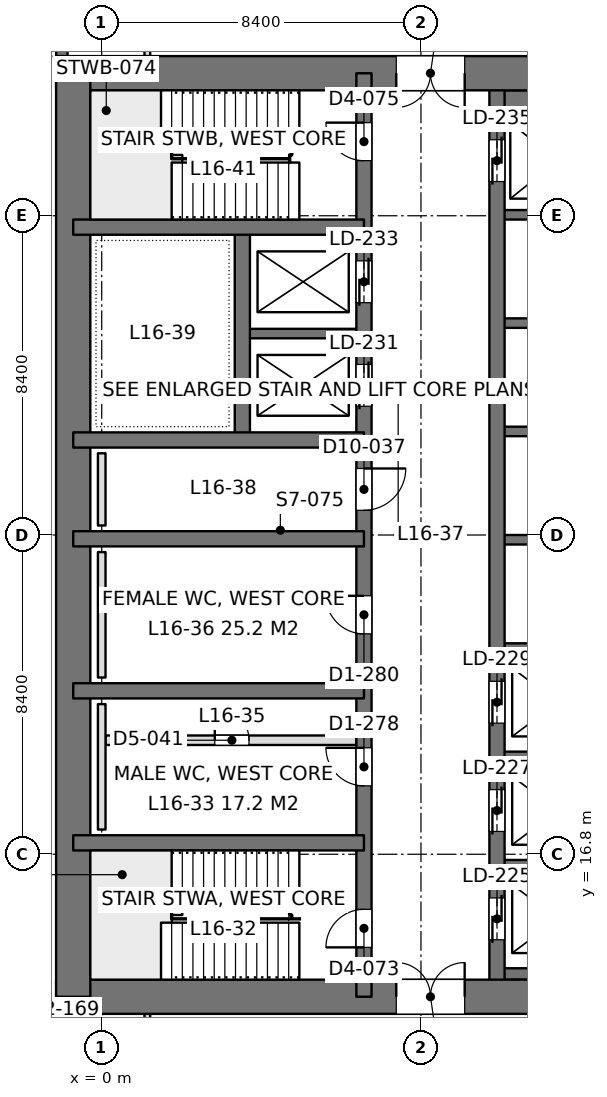
"""IFC4 building model, lengths in metres.
Left out: names, types, materials, properties, quantities, classifications, styles, units other than length and angle.
Written with IfcOpenShell. Run it as: python <this file> out.ifc"""

import sys

from ifc_helpers import new_model, si_unit, direction, frame, frame_2d, origin, place, context, subcontext, project, spatial, rectangle, extrude, element, fill, save


model = new_model("IFC4")
c1 = context("Model", 3, precision=1e-05, world=origin(), true_north=direction((0.0, 1.0)))
c2 = subcontext(c1, "Body", "Model", "MODEL_VIEW")
j1 = project(units=[si_unit("LENGTHUNIT", "METRE"), si_unit("PLANEANGLEUNIT", "RADIAN")], contexts=[c1])
p1 = place(None, origin())
s1 = spatial("IfcSite", under=j1, at=p1, CompositionType="ELEMENT")
p2 = place(p1, origin())
s2 = spatial("IfcBuilding", under=s1, at=p2, CompositionType="ELEMENT")
p3 = place(p2, frame((0.0, 0.0, 72.9)))
s3 = spatial("IfcBuildingStorey", under=s2, at=p3, CompositionType="ELEMENT", Elevation=72.9)
p4 = place(p3, frame((-1.2, 13.05, 0.0), z_axis=(0.0, 0.0, 1.0), x_axis=(1.0, 0.0, 0.0)))
e1 = element("IfcWall", 1, at=p4, inside=s3, PredefinedType="SHEAR", context=c2, shape_type="SweptSolid", body=[
    extrude(rectangle(XDim=18.0, YDim=0.9, at=frame_2d((9.0, 0.0))), origin(), (0.0, 0.0, 1.0), 4.5),
])
p5 = place(p4, frame((8.95, 0.0, 0.0)))
e2 = element("IfcOpeningElement", 2, at=p5, cuts=e1, PredefinedType="OPENING", context=c2, shape_type="SweptSolid", body=[
    extrude(rectangle(XDim=1.8, YDim=2.4, at=frame_2d((0.9, 1.2))), frame((0.0, 0.46, 0.0), z_axis=(0.0, -1.0, 0.0), x_axis=(1.0, 0.0, 0.0)), (0.0, 0.0, 1.0), 0.92),
])
p6 = place(p3, frame((-1.2, 37.35, 0.0), z_axis=(0.0, 0.0, 1.0), x_axis=(1.0, 0.0, 0.0)))
e3 = element("IfcWall", 3, at=p6, inside=s3, PredefinedType="SHEAR", context=c2, shape_type="SweptSolid", body=[
    extrude(rectangle(XDim=18.0, YDim=0.9, at=frame_2d((9.0, 0.0))), origin(), (0.0, 0.0, 1.0), 4.5),
])
p7 = place(p6, frame((8.95, 0.0, 0.0)))
e4 = element("IfcOpeningElement", 4, at=p7, cuts=e3, PredefinedType="OPENING", context=c2, shape_type="SweptSolid", body=[
    extrude(rectangle(XDim=1.8, YDim=2.4, at=frame_2d((0.9, 1.2))), frame((0.0, 0.46, 0.0), z_axis=(0.0, -1.0, 0.0), x_axis=(1.0, 0.0, 0.0)), (0.0, 0.0, 1.0), 0.92),
])
p8 = place(p3, frame((-0.75, 13.05, 0.0), z_axis=(0.0, 0.0, 1.0), x_axis=(0.0, 1.0, 0.0)))
e5 = element("IfcWall", 5, at=p8, inside=s3, PredefinedType="SHEAR", context=c2, shape_type="SweptSolid", body=[
    extrude(rectangle(XDim=24.3, YDim=0.9, at=frame_2d((12.15, 0.0))), origin(), (0.0, 0.0, 1.0), 4.5),
])
p9 = place(p3, frame((6.9, 13.05, 0.0), z_axis=(0.0, 0.0, 1.0), x_axis=(0.0, 1.0, 0.0)))
e6 = element("IfcWall", 6, at=p9, inside=s3, PredefinedType="SHEAR", context=c2, shape_type="SweptSolid", body=[
    extrude(rectangle(XDim=24.3, YDim=0.4, at=frame_2d((12.15, 0.0))), origin(), (0.0, 0.0, 1.0), 4.5),
])
p10 = place(p9, frame((1.3, 0.0, 0.0)))
e7 = element("IfcOpeningElement", 7, at=p10, cuts=e6, PredefinedType="OPENING", context=c2, shape_type="SweptSolid", body=[
    extrude(rectangle(XDim=1.0, YDim=2.2, at=frame_2d((0.5, 1.1))), frame((0.0, 0.21, 0.0), z_axis=(0.0, -1.0, 0.0), x_axis=(1.0, 0.0, 0.0)), (0.0, 0.0, 1.0), 0.42),
])
p11 = place(p9, frame((22.0, 0.0, 0.0)))
e8 = element("IfcOpeningElement", 8, at=p11, cuts=e6, PredefinedType="OPENING", context=c2, shape_type="SweptSolid", body=[
    extrude(rectangle(XDim=1.0, YDim=2.2, at=frame_2d((0.5, 1.1))), frame((0.0, 0.21, 0.0), z_axis=(0.0, -1.0, 0.0), x_axis=(1.0, 0.0, 0.0)), (0.0, 0.0, 1.0), 0.42),
])
p12 = place(p9, frame((5.55, 0.0, 0.0)))
e9 = element("IfcOpeningElement", 9, at=p12, cuts=e6, PredefinedType="OPENING", context=c2, shape_type="SweptSolid", body=[
    extrude(rectangle(XDim=1.0, YDim=2.2, at=frame_2d((0.5, 1.1))), frame((0.0, 0.21, 0.0), z_axis=(0.0, -1.0, 0.0), x_axis=(1.0, 0.0, 0.0)), (0.0, 0.0, 1.0), 0.42),
])
p13 = place(p9, frame((9.55, 0.0, 0.0)))
e10 = element("IfcOpeningElement", 10, at=p13, cuts=e6, PredefinedType="OPENING", context=c2, shape_type="SweptSolid", body=[
    extrude(rectangle(XDim=1.0, YDim=2.2, at=frame_2d((0.5, 1.1))), frame((0.0, 0.21, 0.0), z_axis=(0.0, -1.0, 0.0), x_axis=(1.0, 0.0, 0.0)), (0.0, 0.0, 1.0), 0.42),
])
p14 = place(p9, frame((12.8, 0.0, 0.0)))
e11 = element("IfcOpeningElement", 11, at=p14, cuts=e6, PredefinedType="OPENING", context=c2, shape_type="SweptSolid", body=[
    extrude(rectangle(XDim=1.1, YDim=2.2, at=frame_2d((0.55, 1.1))), frame((0.0, 0.21, 0.0), z_axis=(0.0, -1.0, 0.0), x_axis=(1.0, 0.0, 0.0)), (0.0, 0.0, 1.0), 0.42),
])
p15 = place(p9, frame((15.538, 0.0, 0.0)))
e12 = element("IfcOpeningElement", 12, at=p15, cuts=e6, PredefinedType="OPENING", context=c2, shape_type="SweptSolid", body=[
    extrude(rectangle(XDim=1.1, YDim=2.2, at=frame_2d((0.55, 1.1))), frame((0.0, 0.21, 0.0), z_axis=(0.0, -1.0, 0.0), x_axis=(1.0, 0.0, 0.0)), (0.0, 0.0, 1.0), 0.42),
])
p16 = place(p9, frame((18.262, 0.0, 0.0)))
e13 = element("IfcOpeningElement", 13, at=p16, cuts=e6, PredefinedType="OPENING", context=c2, shape_type="SweptSolid", body=[
    extrude(rectangle(XDim=1.1, YDim=2.2, at=frame_2d((0.55, 1.1))), frame((0.0, 0.21, 0.0), z_axis=(0.0, -1.0, 0.0), x_axis=(1.0, 0.0, 0.0)), (0.0, 0.0, 1.0), 0.42),
])
p17 = place(p3, frame((10.4, 13.05, 0.0), z_axis=(0.0, 0.0, 1.0), x_axis=(0.0, 1.0, 0.0)))
e14 = element("IfcWall", 14, at=p17, inside=s3, PredefinedType="SHEAR", context=c2, shape_type="SweptSolid", body=[
    extrude(rectangle(XDim=24.3, YDim=0.4, at=frame_2d((12.15, 0.0))), origin(), (0.0, 0.0, 1.0), 4.5),
])
p18 = place(p17, frame((1.5, 0.0, 0.0)))
e15 = element("IfcOpeningElement", 15, at=p18, cuts=e14, PredefinedType="OPENING", context=c2, shape_type="SweptSolid", body=[
    extrude(rectangle(XDim=1.1, YDim=2.2, at=frame_2d((0.55, 1.1))), frame((0.0, 0.21, 0.0), z_axis=(0.0, -1.0, 0.0), x_axis=(1.0, 0.0, 0.0)), (0.0, 0.0, 1.0), 0.42),
])
p19 = place(p17, frame((4.35, 0.0, 0.0)))
e16 = element("IfcOpeningElement", 16, at=p19, cuts=e14, PredefinedType="OPENING", context=c2, shape_type="SweptSolid", body=[
    extrude(rectangle(XDim=1.1, YDim=2.2, at=frame_2d((0.55, 1.1))), frame((0.0, 0.21, 0.0), z_axis=(0.0, -1.0, 0.0), x_axis=(1.0, 0.0, 0.0)), (0.0, 0.0, 1.0), 0.42),
])
p20 = place(p17, frame((7.2, 0.0, 0.0)))
e17 = element("IfcOpeningElement", 17, at=p20, cuts=e14, PredefinedType="OPENING", context=c2, shape_type="SweptSolid", body=[
    extrude(rectangle(XDim=1.1, YDim=2.2, at=frame_2d((0.55, 1.1))), frame((0.0, 0.21, 0.0), z_axis=(0.0, -1.0, 0.0), x_axis=(1.0, 0.0, 0.0)), (0.0, 0.0, 1.0), 0.42),
])
p21 = place(p17, frame((21.45, 0.0, 0.0)))
e18 = element("IfcOpeningElement", 18, at=p21, cuts=e14, PredefinedType="OPENING", context=c2, shape_type="SweptSolid", body=[
    extrude(rectangle(XDim=1.1, YDim=2.2, at=frame_2d((0.55, 1.1))), frame((0.0, 0.21, 0.0), z_axis=(0.0, -1.0, 0.0), x_axis=(1.0, 0.0, 0.0)), (0.0, 0.0, 1.0), 0.42),
])
for number, where, z_axis, x_axis in (
    (19, (-0.75, 17.1, 0.0), (0.0, 0.0, 1.0), (1.0, 0.0, 0.0)),
    (20, (-0.75, 21.1, 0.0), (0.0, 0.0, 1.0), (1.0, 0.0, 0.0)),
    (21, (-0.75, 25.1, 0.0), (0.0, 0.0, 1.0), (1.0, 0.0, 0.0)),
    (22, (-0.75, 27.7, 0.0), (0.0, 0.0, 1.0), (1.0, 0.0, 0.0)),
    (23, (-0.75, 33.3, 0.0), (0.0, 0.0, 1.0), (1.0, 0.0, 0.0)),
):
    element("IfcWall", number, at=place(p3, frame(where, z_axis=z_axis, x_axis=x_axis)), inside=s3, PredefinedType="SHEAR", context=c2, shape_type="SweptSolid", body=[
        extrude(rectangle(XDim=7.65, YDim=0.4, at=frame_2d((3.825, 0.0))), origin(), (0.0, 0.0, 1.0), 4.5),
    ])
p22 = place(p3, frame((3.7, 27.7, 0.0), z_axis=(0.0, 0.0, 1.0), x_axis=(0.0, 1.0, 0.0)))
e24 = element("IfcWall", 24, at=p22, inside=s3, PredefinedType="SHEAR", context=c2, shape_type="SweptSolid", body=[
    extrude(rectangle(XDim=5.6, YDim=0.4, at=frame_2d((2.8, 0.0))), origin(), (0.0, 0.0, 1.0), 4.5),
])
p23 = place(p3, frame((3.7, 30.5, 0.0), z_axis=(0.0, 0.0, 1.0), x_axis=(1.0, 0.0, 0.0)))
e25 = element("IfcWall", 25, at=p23, inside=s3, PredefinedType="SHEAR", context=c2, shape_type="SweptSolid", body=[
    extrude(rectangle(XDim=3.2, YDim=0.25, at=frame_2d((1.6, 0.0))), origin(), (0.0, 0.0, 1.0), 4.5),
])
p24 = place(p3, frame((10.4, 13.65, 0.0), z_axis=(0.0, 0.0, 1.0), x_axis=(1.0, 0.0, 0.0)))
e26 = element("IfcWall", 26, at=p24, inside=s3, PredefinedType="SHEAR", context=c2, shape_type="SweptSolid", body=[
    extrude(rectangle(XDim=3.2, YDim=0.3, at=frame_2d((1.6, 0.0))), origin(), (0.0, 0.0, 1.0), 4.5),
])
for number, where, z_axis, x_axis in (
    (27, (10.4, 16.525, 0.0), (0.0, 0.0, 1.0), (1.0, 0.0, 0.0)),
    (28, (10.4, 19.375, 0.0), (0.0, 0.0, 1.0), (1.0, 0.0, 0.0)),
    (29, (10.4, 22.225, 0.0), (0.0, 0.0, 1.0), (1.0, 0.0, 0.0)),
    (30, (10.4, 25.075, 0.0), (0.0, 0.0, 1.0), (1.0, 0.0, 0.0)),
    (31, (10.4, 27.925, 0.0), (0.0, 0.0, 1.0), (1.0, 0.0, 0.0)),
    (32, (10.4, 30.775, 0.0), (0.0, 0.0, 1.0), (1.0, 0.0, 0.0)),
    (33, (10.4, 33.625, 0.0), (0.0, 0.0, 1.0), (1.0, 0.0, 0.0)),
):
    element("IfcWall", number, at=place(p3, frame(where, z_axis=z_axis, x_axis=x_axis)), inside=s3, PredefinedType="SHEAR", context=c2, shape_type="SweptSolid", body=[
        extrude(rectangle(XDim=3.2, YDim=0.25, at=frame_2d((1.6, 0.0))), origin(), (0.0, 0.0, 1.0), 4.5),
    ])
p25 = place(p3, frame((10.4, 36.625, 0.0), z_axis=(0.0, 0.0, 1.0), x_axis=(1.0, 0.0, 0.0)))
e34 = element("IfcWall", 34, at=p25, inside=s3, PredefinedType="SHEAR", context=c2, shape_type="SweptSolid", body=[
    extrude(rectangle(XDim=3.2, YDim=0.55, at=frame_2d((1.6, 0.0))), origin(), (0.0, 0.0, 1.0), 4.5),
])
p26 = place(p3, frame((-1.05, 8.4, 0.0), z_axis=(0.0, 0.0, 1.0), x_axis=(0.0, 1.0, 0.0)))
e35 = element("IfcWall", 35, at=p26, inside=s3, PredefinedType="SOLIDWALL", context=c2, shape_type="SweptSolid", body=[
    extrude(rectangle(XDim=4.2, YDim=0.3, at=frame_2d((2.1, 0.0))), origin(), (0.0, 0.0, 1.0), 4.34),
])
p27 = place(p26, frame((0.9, 0.0, 0.9)))
e36 = element("IfcOpeningElement", 36, at=p27, cuts=e35, PredefinedType="OPENING", context=c2, shape_type="SweptSolid", body=[
    extrude(rectangle(XDim=2.4, YDim=1.9, at=frame_2d((1.2, 0.95))), frame((0.0, 0.16, 0.0), z_axis=(0.0, -1.0, 0.0), x_axis=(1.0, 0.0, 0.0)), (0.0, 0.0, 1.0), 0.32),
])
p28 = place(p3, frame((-1.05, 37.8, 0.0), z_axis=(0.0, 0.0, 1.0), x_axis=(0.0, 1.0, 0.0)))
e37 = element("IfcWall", 37, at=p28, inside=s3, PredefinedType="SOLIDWALL", context=c2, shape_type="SweptSolid", body=[
    extrude(rectangle(XDim=4.2, YDim=0.3, at=frame_2d((2.1, 0.0))), origin(), (0.0, 0.0, 1.0), 4.34),
])
p29 = place(p28, frame((0.9, 0.0, 0.9)))
e38 = element("IfcOpeningElement", 38, at=p29, cuts=e37, PredefinedType="OPENING", context=c2, shape_type="SweptSolid", body=[
    extrude(rectangle(XDim=2.4, YDim=1.9, at=frame_2d((1.2, 0.95))), frame((0.0, 0.16, 0.0), z_axis=(0.0, -1.0, 0.0), x_axis=(1.0, 0.0, 0.0)), (0.0, 0.0, 1.0), 0.32),
])
p30 = place(p3, frame((1.2, 10.8, 0.0), z_axis=(0.0, 0.0, 1.0), x_axis=(0.0, 1.0, 0.0)))
e39 = element("IfcWall", 39, at=p30, inside=s3, PredefinedType="PARTITIONING", context=c2, shape_type="SweptSolid", body=[
    extrude(rectangle(XDim=1.802, YDim=0.15, at=frame_2d((0.901, 0.0))), origin(), (0.0, 0.0, 1.0), 4.34),
])
p31 = place(p3, frame((1.2, 37.8, 0.0), z_axis=(0.0, 0.0, 1.0), x_axis=(0.0, 1.0, 0.0)))
e40 = element("IfcWall", 40, at=p31, inside=s3, PredefinedType="PARTITIONING", context=c2, shape_type="SweptSolid", body=[
    extrude(rectangle(XDim=1.8, YDim=0.15, at=frame_2d((0.9, 0.0))), origin(), (0.0, 0.0, 1.0), 4.34),
])
p32 = place(p3, frame((0.1, 19.8, 0.0), z_axis=(0.0, 0.0, 1.0), x_axis=(1.0, 0.0, 0.0)))
e41 = element("IfcWall", 41, at=p32, inside=s3, PredefinedType="PARTITIONING", context=c2, shape_type="SweptSolid", body=[
    extrude(rectangle(XDim=6.6, YDim=0.25, at=frame_2d((3.3, 0.0))), origin(), (0.0, 0.0, 1.0), 4.3),
])
p33 = place(p32, frame((2.875, 0.0, 0.0)))
e42 = element("IfcOpeningElement", 42, at=p33, cuts=e41, PredefinedType="OPENING", context=c2, shape_type="SweptSolid", body=[
    extrude(rectangle(XDim=0.9, YDim=2.2, at=frame_2d((0.45, 1.1))), frame((0.0, 0.135, 0.0), z_axis=(0.0, -1.0, 0.0), x_axis=(1.0, 0.0, 0.0)), (0.0, 0.0, 1.0), 0.27),
])
for number, where, z_axis, x_axis in (
    (43, (0.0, 17.45, 0.0), (0.0, 0.0, 1.0), (0.0, 1.0, 0.0)),
    (44, (0.0, 21.45, 0.0), (0.0, 0.0, 1.0), (0.0, 1.0, 0.0)),
):
    element("IfcWall", number, at=place(p3, frame(where, z_axis=z_axis, x_axis=x_axis)), inside=s3, PredefinedType="PLUMBINGWALL", context=c2, shape_type="SweptSolid", body=[
        extrude(rectangle(XDim=3.3, YDim=0.2, at=frame_2d((1.65, 0.0))), origin(), (0.0, 0.0, 1.0), 1.2),
    ])
p34 = place(p3, frame((0.0, 25.45, 0.0), z_axis=(0.0, 0.0, 1.0), x_axis=(0.0, 1.0, 0.0)))
e45 = element("IfcWall", 45, at=p34, inside=s3, PredefinedType="PLUMBINGWALL", context=c2, shape_type="SweptSolid", body=[
    extrude(rectangle(XDim=1.9, YDim=0.2, at=frame_2d((0.95, 0.0))), origin(), (0.0, 0.0, 1.0), 1.2),
])
p35 = place(p5, origin())
e46 = element("IfcDoor", 46, at=p35, inside=s3, OperationType="DOUBLE_DOOR_SINGLE_SWING", PredefinedType="DOOR", context=c2, shape_type="SweptSolid", body=[
    extrude(rectangle(XDim=1.8, YDim=2.4, at=frame_2d((0.9, 1.2))), frame((0.0, 0.025, 0.0), z_axis=(0.0, -1.0, 0.0), x_axis=(1.0, 0.0, 0.0)), (0.0, 0.0, 1.0), 0.05),
])
fill(e2, e46)
p36 = place(p7, frame((1.8, 0.0, 0.0), z_axis=(0.0, 0.0, 1.0), x_axis=(-1.0, 0.0, 0.0)))
e47 = element("IfcDoor", 47, at=p36, inside=s3, OperationType="DOUBLE_DOOR_SINGLE_SWING", PredefinedType="DOOR", context=c2, shape_type="SweptSolid", body=[
    extrude(rectangle(XDim=1.8, YDim=2.4, at=frame_2d((0.9, 1.2))), frame((0.0, 0.025, 0.0), z_axis=(0.0, -1.0, 0.0), x_axis=(1.0, 0.0, 0.0)), (0.0, 0.0, 1.0), 0.05),
])
fill(e4, e47)
p37 = place(p10, origin())
e48 = element("IfcDoor", 48, at=p37, inside=s3, OperationType="SINGLE_SWING_LEFT", PredefinedType="DOOR", context=c2, shape_type="SweptSolid", body=[
    extrude(rectangle(XDim=1.0, YDim=2.2, at=frame_2d((0.5, 1.1))), frame((0.0, 0.025, 0.0), z_axis=(0.0, -1.0, 0.0), x_axis=(1.0, 0.0, 0.0)), (0.0, 0.0, 1.0), 0.05),
])
fill(e7, e48)
p38 = place(p11, origin())
e49 = element("IfcDoor", 49, at=p38, inside=s3, OperationType="SINGLE_SWING_RIGHT", PredefinedType="DOOR", context=c2, shape_type="SweptSolid", body=[
    extrude(rectangle(XDim=1.0, YDim=2.2, at=frame_2d((0.5, 1.1))), frame((0.0, 0.025, 0.0), z_axis=(0.0, -1.0, 0.0), x_axis=(1.0, 0.0, 0.0)), (0.0, 0.0, 1.0), 0.05),
])
fill(e8, e49)
p39 = place(p12, origin())
e50 = element("IfcDoor", 50, at=p39, inside=s3, OperationType="SINGLE_SWING_RIGHT", PredefinedType="DOOR", context=c2, shape_type="SweptSolid", body=[
    extrude(rectangle(XDim=1.0, YDim=2.2, at=frame_2d((0.5, 1.1))), frame((0.0, 0.025, 0.0), z_axis=(0.0, -1.0, 0.0), x_axis=(1.0, 0.0, 0.0)), (0.0, 0.0, 1.0), 0.05),
])
fill(e9, e50)
p40 = place(p13, origin())
e51 = element("IfcDoor", 51, at=p40, inside=s3, OperationType="SINGLE_SWING_RIGHT", PredefinedType="DOOR", context=c2, shape_type="SweptSolid", body=[
    extrude(rectangle(XDim=1.0, YDim=2.2, at=frame_2d((0.5, 1.1))), frame((0.0, 0.025, 0.0), z_axis=(0.0, -1.0, 0.0), x_axis=(1.0, 0.0, 0.0)), (0.0, 0.0, 1.0), 0.05),
])
fill(e10, e51)
p41 = place(p14, frame((1.1, 0.0, 0.0), z_axis=(0.0, 0.0, 1.0), x_axis=(-1.0, 0.0, 0.0)))
e52 = element("IfcDoor", 52, at=p41, inside=s3, OperationType="SINGLE_SWING_LEFT", PredefinedType="DOOR", context=c2, shape_type="SweptSolid", body=[
    extrude(rectangle(XDim=1.1, YDim=2.2, at=frame_2d((0.55, 1.1))), frame((0.0, 0.025, 0.0), z_axis=(0.0, -1.0, 0.0), x_axis=(1.0, 0.0, 0.0)), (0.0, 0.0, 1.0), 0.05),
])
fill(e11, e52)
p42 = place(p18, origin())
e53 = element("IfcDoor", 53, at=p42, inside=s3, OperationType="DOUBLE_DOOR_SLIDING", PredefinedType="DOOR", context=c2, shape_type="SweptSolid", body=[
    extrude(rectangle(XDim=1.1, YDim=2.2, at=frame_2d((0.55, 1.1))), frame((0.0, 0.025, 0.0), z_axis=(0.0, -1.0, 0.0), x_axis=(1.0, 0.0, 0.0)), (0.0, 0.0, 1.0), 0.05),
])
fill(e15, e53)
p43 = place(p19, origin())
e54 = element("IfcDoor", 54, at=p43, inside=s3, OperationType="DOUBLE_DOOR_SLIDING", PredefinedType="DOOR", context=c2, shape_type="SweptSolid", body=[
    extrude(rectangle(XDim=1.1, YDim=2.2, at=frame_2d((0.55, 1.1))), frame((0.0, 0.025, 0.0), z_axis=(0.0, -1.0, 0.0), x_axis=(1.0, 0.0, 0.0)), (0.0, 0.0, 1.0), 0.05),
])
fill(e16, e54)
p44 = place(p20, origin())
e55 = element("IfcDoor", 55, at=p44, inside=s3, OperationType="DOUBLE_DOOR_SLIDING", PredefinedType="DOOR", context=c2, shape_type="SweptSolid", body=[
    extrude(rectangle(XDim=1.1, YDim=2.2, at=frame_2d((0.55, 1.1))), frame((0.0, 0.025, 0.0), z_axis=(0.0, -1.0, 0.0), x_axis=(1.0, 0.0, 0.0)), (0.0, 0.0, 1.0), 0.05),
])
fill(e17, e55)
p45 = place(p21, origin())
e56 = element("IfcDoor", 56, at=p45, inside=s3, OperationType="DOUBLE_DOOR_SLIDING", PredefinedType="DOOR", context=c2, shape_type="SweptSolid", body=[
    extrude(rectangle(XDim=1.1, YDim=2.2, at=frame_2d((0.55, 1.1))), frame((0.0, 0.025, 0.0), z_axis=(0.0, -1.0, 0.0), x_axis=(1.0, 0.0, 0.0)), (0.0, 0.0, 1.0), 0.05),
])
fill(e18, e56)
p46 = place(p15, origin())
e57 = element("IfcDoor", 57, at=p46, inside=s3, OperationType="DOUBLE_DOOR_SLIDING", PredefinedType="DOOR", context=c2, shape_type="SweptSolid", body=[
    extrude(rectangle(XDim=1.1, YDim=2.2, at=frame_2d((0.55, 1.1))), frame((0.0, 0.025, 0.0), z_axis=(0.0, -1.0, 0.0), x_axis=(1.0, 0.0, 0.0)), (0.0, 0.0, 1.0), 0.05),
])
fill(e12, e57)
p47 = place(p16, origin())
e58 = element("IfcDoor", 58, at=p47, inside=s3, OperationType="DOUBLE_DOOR_SLIDING", PredefinedType="DOOR", context=c2, shape_type="SweptSolid", body=[
    extrude(rectangle(XDim=1.1, YDim=2.2, at=frame_2d((0.55, 1.1))), frame((0.0, 0.025, 0.0), z_axis=(0.0, -1.0, 0.0), x_axis=(1.0, 0.0, 0.0)), (0.0, 0.0, 1.0), 0.05),
])
fill(e13, e58)
p48 = place(p33, origin())
e59 = element("IfcDoor", 59, at=p48, inside=s3, OperationType="SINGLE_SWING_LEFT", PredefinedType="DOOR", context=c2, shape_type="SweptSolid", body=[
    extrude(rectangle(XDim=0.9, YDim=2.2, at=frame_2d((0.45, 1.1))), frame((0.0, 0.025, 0.0), z_axis=(0.0, -1.0, 0.0), x_axis=(1.0, 0.0, 0.0)), (0.0, 0.0, 1.0), 0.05),
])
fill(e42, e59)
save(model, sys.argv[1])
